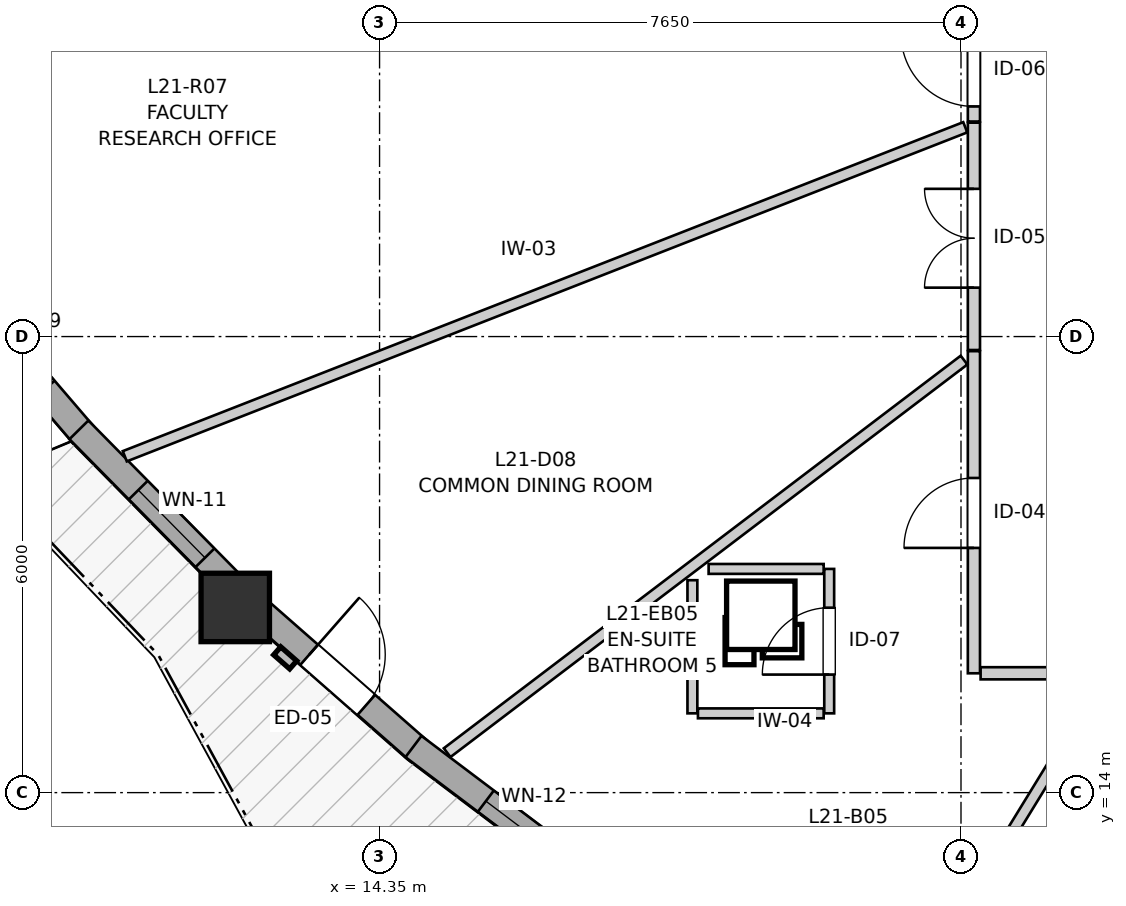
"""IFC4 building model, lengths in metres.
Left out: names, types, materials, properties, quantities, classifications, styles, units other than length and angle.
Written with IfcOpenShell. Run it as: python <this file> out.ifc"""

import sys

from ifc_helpers import new_model, si_unit, direction, frame, frame_2d, origin, origin_2d, place, context, subcontext, project, spatial, rectangle, extrude, source, transform, mapped, element, fill, save


model = new_model("IFC4")
c1 = context("Model", 3, precision=1e-05, world=origin(), true_north=direction((0.0, 1.0)))
c2 = subcontext(c1, "Body", "Model", "MODEL_VIEW")
j1 = project(units=[si_unit("LENGTHUNIT", "METRE"), si_unit("PLANEANGLEUNIT", "RADIAN")], contexts=[c1])
p1 = place(None, origin())
s1 = spatial("IfcSite", under=j1, at=p1, CompositionType="ELEMENT")
p2 = place(p1, origin())
s2 = spatial("IfcBuilding", under=s1, at=p2, CompositionType="ELEMENT")
p3 = place(p2, frame((0.0, 0.0, 73.6)))
s3 = spatial("IfcBuildingStorey", under=s2, at=p3, CompositionType="ELEMENT", Elevation=73.6)
m1 = source(origin(), c2, "Body", "SweptSolid", [
    extrude(rectangle(XDim=0.9, YDim=0.9, at=origin_2d()), origin(), (0.0, 0.0, 1.0), 2.95),
])
p4 = place(p3, frame((12.451, 16.436, 0.0), z_axis=(0.0, 0.0, 1.0), x_axis=(1.0, 0.0, 0.0)))
e1 = element("IfcColumn", 1, at=p4, inside=s3, PredefinedType="COLUMN", context=c2, shape_type="MappedRepresentation", body=[
    mapped(m1, transform((0.0, 0.0, 0.0), x_axis=(1.0, 0.0, 0.0), y_axis=(0.0, 1.0, 0.0), z_axis=(0.0, 0.0, 1.0), scale=1.0)),
])
p5 = place(p3, frame((8.402, 21.102, 0.0), z_axis=(0.0, 0.0, 1.0), x_axis=(0.650797748491, -0.759251138004, 0.0)))
e2 = element("IfcWall", 2, at=p5, inside=s3, PredefinedType="SOLIDWALL", context=c2, shape_type="SweptSolid", body=[
    extrude(rectangle(XDim=3.154, YDim=0.35, at=frame_2d((1.577, 0.0))), origin(), (0.0, 0.0, 1.0), 2.48),
])
p6 = place(p5, frame((0.767, 0.0, 0.82)))
e3 = element("IfcOpeningElement", 3, at=p6, cuts=e2, PredefinedType="OPENING", context=c2, shape_type="SweptSolid", body=[
    extrude(rectangle(XDim=1.6, YDim=1.35, at=frame_2d((0.8, 0.675))), frame((0.0, 0.185, 0.0), z_axis=(0.0, -1.0, 0.0), x_axis=(1.0, 0.0, 0.0)), (0.0, 0.0, 1.0), 0.37),
])
p7 = place(p3, frame((10.394, 18.773, 0.0), z_axis=(0.0, 0.0, 1.0), x_axis=(0.701965316192, -0.712211130819, 0.0)))
e4 = element("IfcWall", 4, at=p7, inside=s3, PredefinedType="SOLIDWALL", context=c2, shape_type="SweptSolid", body=[
    extrude(rectangle(XDim=2.883, YDim=0.35, at=frame_2d((1.442, 0.0))), origin(), (0.0, 0.0, 1.0), 2.48),
])
p8 = place(p7, frame((1.113, 0.0, 0.82)))
e5 = element("IfcOpeningElement", 5, at=p8, cuts=e4, PredefinedType="OPENING", context=c2, shape_type="SweptSolid", body=[
    extrude(rectangle(XDim=1.25, YDim=1.35, at=frame_2d((0.625, 0.675))), frame((0.0, 0.185, 0.0), z_axis=(0.0, -1.0, 0.0), x_axis=(1.0, 0.0, 0.0)), (0.0, 0.0, 1.0), 0.37),
])
p9 = place(p3, frame((12.736, 16.419, 0.0), z_axis=(0.0, 0.0, 1.0), x_axis=(0.751507962483, -0.659724019818, 0.0)))
e6 = element("IfcWall", 6, at=p9, inside=s3, PredefinedType="SOLIDWALL", context=c2, shape_type="SweptSolid", body=[
    extrude(rectangle(XDim=2.833, YDim=0.35, at=frame_2d((1.417, 0.0))), origin(), (0.0, 0.0, 1.0), 2.48),
])
p10 = place(p9, frame((0.917, 0.0, 0.0)))
e7 = element("IfcOpeningElement", 7, at=p10, cuts=e6, PredefinedType="OPENING", context=c2, shape_type="SweptSolid", body=[
    extrude(rectangle(XDim=1.0, YDim=2.1, at=frame_2d((0.5, 1.05))), frame((0.0, 0.185, 0.0), z_axis=(0.0, -1.0, 0.0), x_axis=(1.0, 0.0, 0.0)), (0.0, 0.0, 1.0), 0.37),
])
p11 = place(p3, frame((14.796, 14.606, 0.0), z_axis=(0.0, 0.0, 1.0), x_axis=(0.79839776153, -0.602130396496, 0.0)))
e8 = element("IfcWall", 8, at=p11, inside=s3, PredefinedType="SOLIDWALL", context=c2, shape_type="SweptSolid", body=[
    extrude(rectangle(XDim=3.004, YDim=0.35, at=frame_2d((1.502, 0.0))), origin(), (0.0, 0.0, 1.0), 2.48),
])
p12 = place(p11, frame((1.193, 0.0, 0.82)))
e9 = element("IfcOpeningElement", 9, at=p12, cuts=e8, PredefinedType="OPENING", context=c2, shape_type="SweptSolid", body=[
    extrude(rectangle(XDim=0.95, YDim=1.35, at=frame_2d((0.475, 0.675))), frame((0.0, 0.185, 0.0), z_axis=(0.0, -1.0, 0.0), x_axis=(1.0, 0.0, 0.0)), (0.0, 0.0, 1.0), 0.37),
])
p13 = place(p3, frame((22.17, 15.57, 0.0), z_axis=(0.0, 0.0, 1.0), x_axis=(0.0, 1.0, 0.0)))
e10 = element("IfcWall", 10, at=p13, inside=s3, PredefinedType="PARTITIONING", context=c2, shape_type="SweptSolid", body=[
    extrude(rectangle(XDim=4.238, YDim=0.16, at=frame_2d((2.119, 0.0))), origin(), (0.0, 0.0, 1.0), 2.95),
])
p14 = place(p13, frame((1.649, 0.0, 0.0)))
e11 = element("IfcOpeningElement", 11, at=p14, cuts=e10, PredefinedType="OPENING", context=c2, shape_type="SweptSolid", body=[
    extrude(rectangle(XDim=0.92, YDim=2.1, at=frame_2d((0.46, 1.05))), frame((0.0, 0.09, 0.0), z_axis=(0.0, -1.0, 0.0), x_axis=(1.0, 0.0, 0.0)), (0.0, 0.0, 1.0), 0.18),
])
p15 = place(p3, frame((22.17, 19.823, 0.0), z_axis=(0.0, 0.0, 1.0), x_axis=(0.0, 1.0, 0.0)))
e12 = element("IfcWall", 12, at=p15, inside=s3, PredefinedType="PARTITIONING", context=c2, shape_type="SweptSolid", body=[
    extrude(rectangle(XDim=2.991, YDim=0.16, at=frame_2d((1.496, 0.0))), origin(), (0.0, 0.0, 1.0), 2.95),
])
p16 = place(p15, frame((0.821, 0.0, 0.0)))
e13 = element("IfcOpeningElement", 13, at=p16, cuts=e12, PredefinedType="OPENING", context=c2, shape_type="SweptSolid", body=[
    extrude(rectangle(XDim=1.3, YDim=2.1, at=frame_2d((0.65, 1.05))), frame((0.0, 0.09, 0.0), z_axis=(0.0, -1.0, 0.0), x_axis=(1.0, 0.0, 0.0)), (0.0, 0.0, 1.0), 0.18),
])
p17 = place(p3, frame((20.266, 15.043, 0.0), z_axis=(0.0, 0.0, 1.0), x_axis=(0.0, 1.0, 0.0)))
e14 = element("IfcWall", 14, at=p17, inside=s3, PredefinedType="PARTITIONING", context=c2, shape_type="SweptSolid", body=[
    extrude(rectangle(XDim=1.9, YDim=0.13, at=frame_2d((0.95, 0.0))), origin(), (0.0, 0.0, 1.0), 2.95),
])
p18 = place(p17, frame((0.51, 0.0, 0.0)))
e15 = element("IfcOpeningElement", 15, at=p18, cuts=e14, PredefinedType="OPENING", context=c2, shape_type="SweptSolid", body=[
    extrude(rectangle(XDim=0.88, YDim=2.05, at=frame_2d((0.44, 1.025))), frame((0.0, 0.075, 0.0), z_axis=(0.0, -1.0, 0.0), x_axis=(1.0, 0.0, 0.0)), (0.0, 0.0, 1.0), 0.15),
])
p19 = place(p3, frame((22.17, 22.829, 0.0), z_axis=(0.0, 0.0, 1.0), x_axis=(0.0, 1.0, 0.0)))
e16 = element("IfcWall", 16, at=p19, inside=s3, PredefinedType="PARTITIONING", context=c2, shape_type="SweptSolid", body=[
    extrude(rectangle(XDim=1.321, YDim=0.16, at=frame_2d((0.66, 0.0))), origin(), (0.0, 0.0, 1.0), 2.95),
])
p20 = place(p19, frame((0.198, 0.0, 0.0)))
e17 = element("IfcOpeningElement", 17, at=p20, cuts=e16, PredefinedType="OPENING", context=c2, shape_type="SweptSolid", body=[
    extrude(rectangle(XDim=0.96, YDim=2.1, at=frame_2d((0.48, 1.05))), frame((0.0, 0.09, 0.0), z_axis=(0.0, -1.0, 0.0), x_axis=(1.0, 0.0, 0.0)), (0.0, 0.0, 1.0), 0.18),
])
p21 = place(p3, frame((10.998, 18.425, 0.0), z_axis=(0.0, 0.0, 1.0), x_axis=(0.931213049878, 0.364475315676, 0.0)))
e18 = element("IfcWall", 18, at=p21, inside=s3, PredefinedType="PARTITIONING", context=c2, shape_type="SweptSolid", body=[
    extrude(rectangle(XDim=11.875, YDim=0.145, at=frame_2d((5.938, 0.0))), origin(), (0.0, 0.0, 1.0), 2.95),
])
p22 = place(p3, frame((15.239, 14.526, 0.0), z_axis=(0.0, 0.0, 1.0), x_axis=(0.796393529077, 0.604778758592, 0.0)))
e19 = element("IfcWall", 19, at=p22, inside=s3, PredefinedType="PARTITIONING", context=c2, shape_type="SweptSolid", body=[
    extrude(rectangle(XDim=8.539, YDim=0.145, at=frame_2d((4.27, 0.0))), origin(), (0.0, 0.0, 1.0), 2.95),
])
p23 = place(p3, frame((20.973, 10.715, 0.0), z_axis=(0.0, 0.0, 1.0), x_axis=(0.522906546436, 0.852390018533, 0.0)))
e20 = element("IfcWall", 20, at=p23, inside=s3, PredefinedType="PARTITIONING", context=c2, shape_type="SweptSolid", body=[
    extrude(rectangle(XDim=5.55, YDim=0.145, at=frame_2d((2.775, 0.0))), origin(), (0.0, 0.0, 1.0), 2.95),
])
p24 = place(p3, frame((18.466, 15.043, 0.0), z_axis=(0.0, 0.0, 1.0), x_axis=(0.0, 1.0, 0.0)))
e21 = element("IfcWall", 21, at=p24, inside=s3, PredefinedType="PARTITIONING", context=c2, shape_type="SweptSolid", body=[
    extrude(rectangle(XDim=1.752, YDim=0.13, at=frame_2d((0.876, 0.0))), origin(), (0.0, 0.0, 1.0), 2.95),
])
p25 = place(p3, frame((18.679, 16.943, 0.0), z_axis=(0.0, 0.0, 1.0), x_axis=(1.0, 0.0, 0.0)))
e22 = element("IfcWall", 22, at=p25, inside=s3, PredefinedType="PARTITIONING", context=c2, shape_type="SweptSolid", body=[
    extrude(rectangle(XDim=1.514, YDim=0.13, at=frame_2d((0.757, 0.0))), origin(), (0.0, 0.0, 1.0), 2.95),
])
p26 = place(p3, frame((18.539, 15.043, 0.0), z_axis=(0.0, 0.0, 1.0), x_axis=(1.0, 0.0, 0.0)))
e23 = element("IfcWall", 23, at=p26, inside=s3, PredefinedType="PARTITIONING", context=c2, shape_type="SweptSolid", body=[
    extrude(rectangle(XDim=1.654, YDim=0.13, at=frame_2d((0.827, 0.0))), origin(), (0.0, 0.0, 1.0), 2.95),
])
p27 = place(p3, frame((22.258, 15.57, 0.0), z_axis=(0.0, 0.0, 1.0), x_axis=(1.0, 0.0, 0.0)))
e24 = element("IfcWall", 24, at=p27, inside=s3, PredefinedType="PARTITIONING", context=c2, shape_type="SweptSolid", body=[
    extrude(rectangle(XDim=1.52, YDim=0.16, at=frame_2d((0.76, 0.0))), origin(), (0.0, 0.0, 1.0), 2.95),
])
m2 = source(origin(), c2, "Body", "SweptSolid", [
    extrude(rectangle(XDim=1.25, YDim=1.35, at=frame_2d((0.625, 0.675))), frame((0.0, 0.03, 0.0), z_axis=(0.0, -1.0, 0.0), x_axis=(1.0, 0.0, 0.0)), (0.0, 0.0, 1.0), 0.06),
])
p28 = place(p8, origin())
e25 = element("IfcWindow", 25, at=p28, inside=s3, PartitioningType="SINGLE_PANEL", PredefinedType="WINDOW", context=c2, shape_type="MappedRepresentation", body=[
    mapped(m2, transform((0.0, 0.0, 0.0), x_axis=(1.0, 0.0, 0.0), y_axis=(0.0, 1.0, 0.0), z_axis=(0.0, 0.0, 1.0), scale=1.0)),
])
fill(e5, e25)
m3 = source(origin(), c2, "Body", "SweptSolid", [
    extrude(rectangle(XDim=0.95, YDim=1.35, at=frame_2d((0.475, 0.675))), frame((0.0, 0.03, 0.0), z_axis=(0.0, -1.0, 0.0), x_axis=(1.0, 0.0, 0.0)), (0.0, 0.0, 1.0), 0.06),
])
p29 = place(p12, origin())
e26 = element("IfcWindow", 26, at=p29, inside=s3, PartitioningType="SINGLE_PANEL", PredefinedType="WINDOW", context=c2, shape_type="MappedRepresentation", body=[
    mapped(m3, transform((0.0, 0.0, 0.0), x_axis=(1.0, 0.0, 0.0), y_axis=(0.0, 1.0, 0.0), z_axis=(0.0, 0.0, 1.0), scale=1.0)),
])
fill(e9, e26)
m4 = source(origin(), c2, "Body", "SweptSolid", [
    extrude(rectangle(XDim=1.0, YDim=2.1, at=frame_2d((0.5, 1.05))), frame((0.0, 0.025, 0.0), z_axis=(0.0, -1.0, 0.0), x_axis=(1.0, 0.0, 0.0)), (0.0, 0.0, 1.0), 0.05),
])
p30 = place(p10, origin())
e27 = element("IfcDoor", 27, at=p30, inside=s3, OperationType="SINGLE_SWING_LEFT", PredefinedType="DOOR", context=c2, shape_type="MappedRepresentation", body=[
    mapped(m4, transform((0.0, 0.0, 0.0), x_axis=(1.0, 0.0, 0.0), y_axis=(0.0, 1.0, 0.0), z_axis=(0.0, 0.0, 1.0), scale=1.0)),
])
fill(e7, e27)
m5 = source(origin(), c2, "Body", "SweptSolid", [
    extrude(rectangle(XDim=0.92, YDim=2.1, at=frame_2d((0.46, 1.05))), frame((0.0, 0.025, 0.0), z_axis=(0.0, -1.0, 0.0), x_axis=(1.0, 0.0, 0.0)), (0.0, 0.0, 1.0), 0.05),
])
p31 = place(p14, origin())
e28 = element("IfcDoor", 28, at=p31, inside=s3, OperationType="SINGLE_SWING_LEFT", PredefinedType="DOOR", context=c2, shape_type="MappedRepresentation", body=[
    mapped(m5, transform((0.0, 0.0, 0.0), x_axis=(1.0, 0.0, 0.0), y_axis=(0.0, 1.0, 0.0), z_axis=(0.0, 0.0, 1.0), scale=1.0)),
])
fill(e11, e28)
m6 = source(origin(), c2, "Body", "SweptSolid", [
    extrude(rectangle(XDim=1.3, YDim=2.1, at=frame_2d((0.65, 1.05))), frame((0.0, 0.025, 0.0), z_axis=(0.0, -1.0, 0.0), x_axis=(1.0, 0.0, 0.0)), (0.0, 0.0, 1.0), 0.05),
])
p32 = place(p16, origin())
e29 = element("IfcDoor", 29, at=p32, inside=s3, OperationType="DOUBLE_DOOR_SINGLE_SWING", PredefinedType="DOOR", context=c2, shape_type="MappedRepresentation", body=[
    mapped(m6, transform((0.0, 0.0, 0.0), x_axis=(1.0, 0.0, 0.0), y_axis=(0.0, 1.0, 0.0), z_axis=(0.0, 0.0, 1.0), scale=1.0)),
])
fill(e13, e29)
m7 = source(origin(), c2, "Body", "SweptSolid", [
    extrude(rectangle(XDim=0.88, YDim=2.05, at=frame_2d((0.44, 1.025))), frame((0.0, 0.025, 0.0), z_axis=(0.0, -1.0, 0.0), x_axis=(1.0, 0.0, 0.0)), (0.0, 0.0, 1.0), 0.05),
])
p33 = place(p18, origin())
e30 = element("IfcDoor", 30, at=p33, inside=s3, OperationType="SINGLE_SWING_LEFT", PredefinedType="DOOR", context=c2, shape_type="MappedRepresentation", body=[
    mapped(m7, transform((0.0, 0.0, 0.0), x_axis=(1.0, 0.0, 0.0), y_axis=(0.0, 1.0, 0.0), z_axis=(0.0, 0.0, 1.0), scale=1.0)),
])
fill(e15, e30)
m8 = source(origin(), c2, "Body", "SweptSolid", [
    extrude(rectangle(XDim=0.96, YDim=2.1, at=frame_2d((0.48, 1.05))), frame((0.0, 0.025, 0.0), z_axis=(0.0, -1.0, 0.0), x_axis=(1.0, 0.0, 0.0)), (0.0, 0.0, 1.0), 0.05),
])
p34 = place(p20, origin())
e31 = element("IfcDoor", 31, at=p34, inside=s3, OperationType="SINGLE_SWING_RIGHT", PredefinedType="DOOR", context=c2, shape_type="MappedRepresentation", body=[
    mapped(m8, transform((0.0, 0.0, 0.0), x_axis=(1.0, 0.0, 0.0), y_axis=(0.0, 1.0, 0.0), z_axis=(0.0, 0.0, 1.0), scale=1.0)),
])
fill(e17, e31)
save(model, sys.argv[1])
